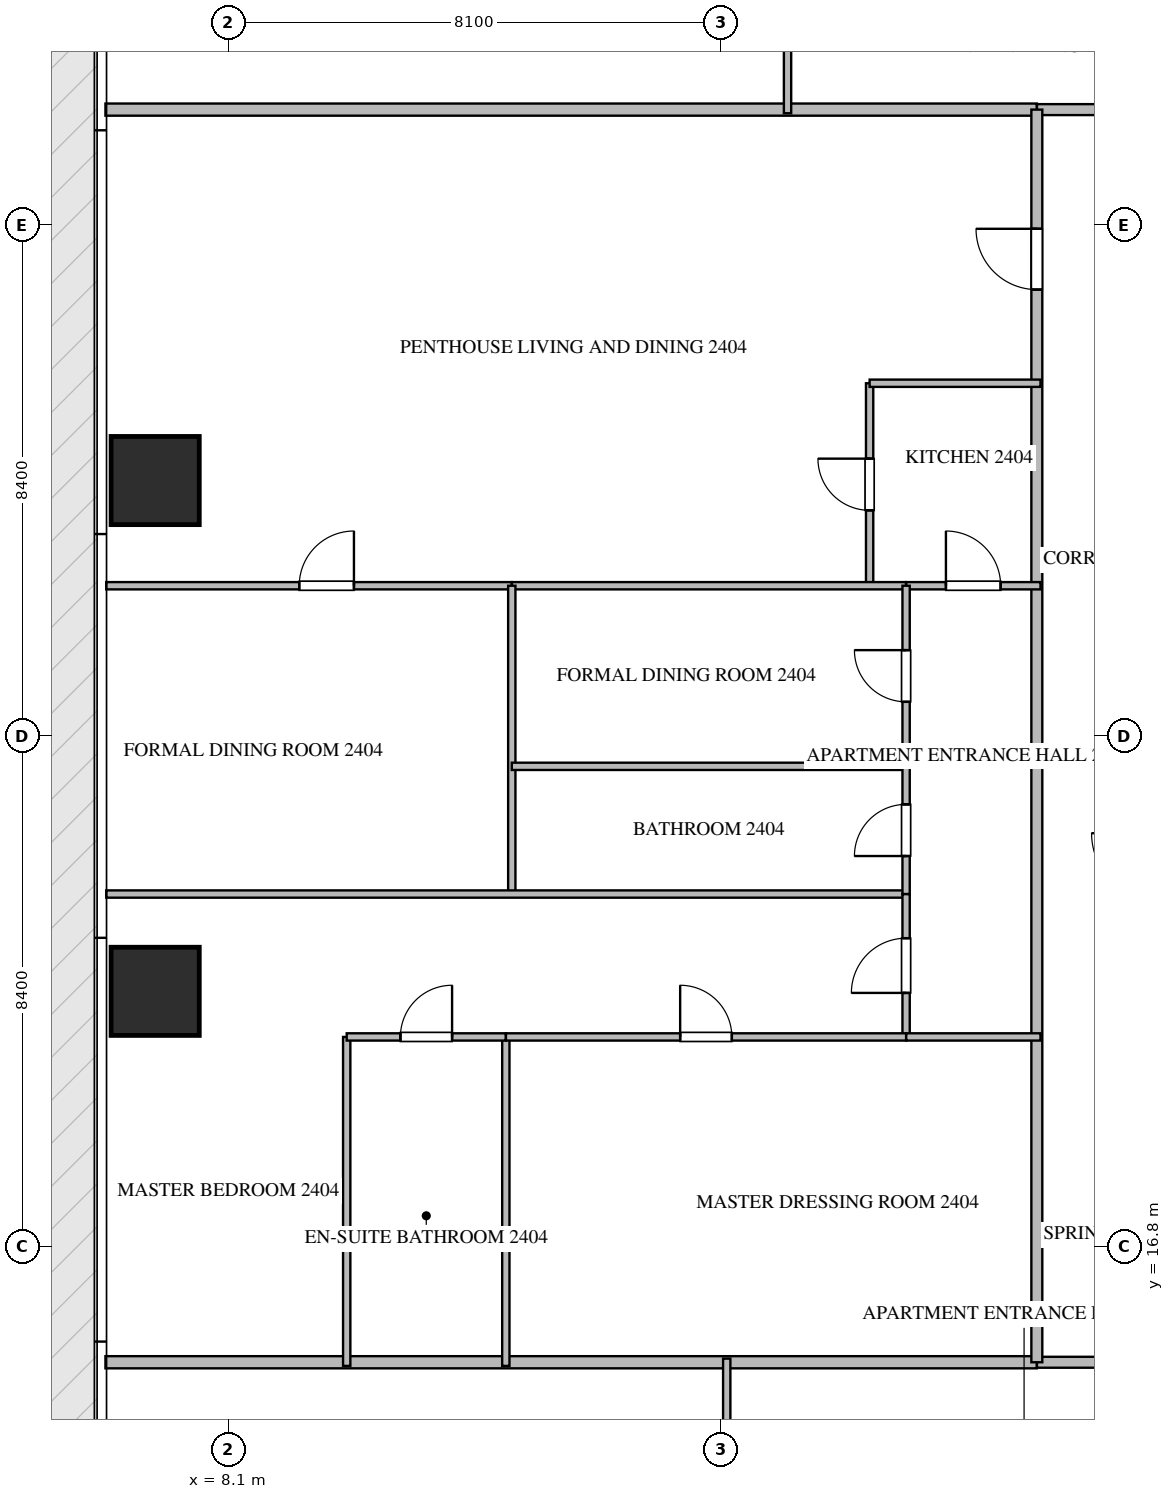
"""IFC4 building model, lengths in metres.
Left out: names, types, materials, properties, quantities, classifications, styles, units other than length and angle.
Written with IfcOpenShell. Run it as: python <this file> out.ifc"""

import sys

from ifc_helpers import new_model, si_unit, direction, frame, frame_2d, origin, origin_2d, place, context, subcontext, project, spatial, rectangle, extrude, source, transform, mapped, element, fill, save


model = new_model("IFC4")
c1 = context("Model", 3, precision=1e-05, world=origin(), true_north=direction((0.0, 1.0)))
c2 = subcontext(c1, "Body", "Model", "MODEL_VIEW")
j1 = project(units=[si_unit("LENGTHUNIT", "METRE"), si_unit("PLANEANGLEUNIT", "RADIAN")], contexts=[c1])
p1 = place(None, origin())
s1 = spatial("IfcSite", under=j1, at=p1, CompositionType="ELEMENT")
p2 = place(p1, origin())
s2 = spatial("IfcBuilding", under=s1, at=p2, CompositionType="ELEMENT")
p3 = place(p2, frame((0.0, 0.0, 97.95)))
s3 = spatial("IfcBuildingStorey", under=s2, at=p3, CompositionType="ELEMENT", Elevation=97.95)
m1 = source(origin(), c2, "Body", "SweptSolid", [
    extrude(rectangle(XDim=1.45, YDim=1.45, at=origin_2d()), origin(), (0.0, 0.0, 1.0), 3.75),
])
for number, where, z_axis, x_axis in (
    (1, (6.9, 21.0, -0.26), (0.0, 0.0, 1.0), (1.0, 0.0, 0.0)),
    (2, (6.9, 29.4, -0.26), (0.0, 0.0, 1.0), (1.0, 0.0, 0.0)),
):
    element("IfcColumn", number, at=place(p3, frame(where, z_axis=z_axis, x_axis=x_axis)), inside=s3, PredefinedType="COLUMN", context=c2, shape_type="MappedRepresentation", body=[
        mapped(m1, transform((0.0, 0.0, 0.0), scale=1.0)),
    ])
for number, where, z_axis, x_axis in (
    (3, (6.082, 14.9, 0.0), (0.0, 0.0, 1.0), (1.0, 0.0, 0.0)),
    (4, (6.082, 35.5, 0.0), (0.0, 0.0, 1.0), (1.0, 0.0, 0.0)),
):
    element("IfcWall", number, at=place(p3, frame(where, z_axis=z_axis, x_axis=x_axis)), inside=s3, PredefinedType="PARTITIONING", context=c2, shape_type="SweptSolid", body=[
        extrude(rectangle(XDim=15.318, YDim=0.2, at=frame_2d((7.659, 0.0))), origin(), (0.0, 0.0, 1.0), 3.49),
    ])
p4 = place(p3, frame((21.402, 14.9, 0.0), z_axis=(0.0, 0.0, 1.0), x_axis=(1.0, 0.0, 0.0)))
e5 = element("IfcWall", 5, at=p4, inside=s3, PredefinedType="PARTITIONING", context=c2, shape_type="SweptSolid", body=[
    extrude(rectangle(XDim=21.996, YDim=0.18, at=frame_2d((10.998, 0.0))), origin(), (0.0, 0.0, 1.0), 3.49),
])
p5 = place(p4, frame((7.454, 0.0, 0.0)))
e6 = element("IfcOpeningElement", 6, at=p5, cuts=e5, PredefinedType="OPENING", context=c2, shape_type="SweptSolid", body=[
    extrude(rectangle(XDim=1.0, YDim=2.15, at=frame_2d((0.5, 1.075))), frame((0.0, 0.1, 0.0), z_axis=(0.0, -1.0, 0.0), x_axis=(1.0, 0.0, 0.0)), (0.0, 0.0, 1.0), 0.2),
])
p6 = place(p4, frame((13.542, 0.0, 0.0)))
e7 = element("IfcOpeningElement", 7, at=p6, cuts=e5, PredefinedType="OPENING", context=c2, shape_type="SweptSolid", body=[
    extrude(rectangle(XDim=1.0, YDim=2.15, at=frame_2d((0.5, 1.075))), frame((0.0, 0.1, 0.0), z_axis=(0.0, -1.0, 0.0), x_axis=(1.0, 0.0, 0.0)), (0.0, 0.0, 1.0), 0.2),
])
p7 = place(p3, frame((21.402, 35.5, 0.0), z_axis=(0.0, 0.0, 1.0), x_axis=(1.0, 0.0, 0.0)))
e8 = element("IfcWall", 8, at=p7, inside=s3, PredefinedType="PARTITIONING", context=c2, shape_type="SweptSolid", body=[
    extrude(rectangle(XDim=21.996, YDim=0.18, at=frame_2d((10.998, 0.0))), origin(), (0.0, 0.0, 1.0), 3.49),
])
p8 = place(p7, frame((7.202, 0.0, 0.0)))
e9 = element("IfcOpeningElement", 9, at=p8, cuts=e8, PredefinedType="OPENING", context=c2, shape_type="SweptSolid", body=[
    extrude(rectangle(XDim=1.0, YDim=2.15, at=frame_2d((0.5, 1.075))), frame((0.0, 0.1, 0.0), z_axis=(0.0, -1.0, 0.0), x_axis=(1.0, 0.0, 0.0)), (0.0, 0.0, 1.0), 0.2),
])
p9 = place(p3, frame((21.4, 14.9, 0.0), z_axis=(0.0, 0.0, 1.0), x_axis=(0.0, 1.0, 0.0)))
e10 = element("IfcWall", 10, at=p9, inside=s3, PredefinedType="PARTITIONING", context=c2, shape_type="SweptSolid", body=[
    extrude(rectangle(XDim=20.6, YDim=0.18, at=frame_2d((10.3, 0.0))), origin(), (0.0, 0.0, 1.0), 3.49),
])
p10 = place(p9, frame((17.64, 0.0, 0.0)))
e11 = element("IfcOpeningElement", 11, at=p10, cuts=e10, PredefinedType="OPENING", context=c2, shape_type="SweptSolid", body=[
    extrude(rectangle(XDim=1.0, YDim=2.15, at=frame_2d((0.5, 1.075))), frame((0.0, 0.1, 0.0), z_axis=(0.0, -1.0, 0.0), x_axis=(1.0, 0.0, 0.0)), (0.0, 0.0, 1.0), 0.2),
])
for number, where, z_axis, x_axis in (
    (12, (16.3, 12.752, 0.0), (0.0, 0.0, 1.0), (0.0, 1.0, 0.0)),
    (13, (17.3, 37.648, 0.0), (0.0, 0.0, 1.0), (0.0, -1.0, 0.0)),
):
    element("IfcWall", number, at=place(p3, frame(where, z_axis=z_axis, x_axis=x_axis)), inside=s3, PredefinedType="PARTITIONING", context=c2, shape_type="SweptSolid", body=[
        extrude(rectangle(XDim=2.208, YDim=0.12, at=frame_2d((1.104, 0.0))), origin(), (0.0, 0.0, 1.0), 3.49),
    ])
p11 = place(p3, frame((18.65, 27.67, 0.0), z_axis=(0.0, 0.0, 1.0), x_axis=(0.0, 1.0, 0.0)))
e14 = element("IfcWall", 14, at=p11, inside=s3, PredefinedType="PARTITIONING", context=c2, shape_type="SweptSolid", body=[
    extrude(rectangle(XDim=3.33, YDim=0.12, at=frame_2d((1.665, 0.0))), origin(), (0.0, 0.0, 1.0), 3.49),
])
p12 = place(p11, frame((1.24, 0.0, 0.0)))
e15 = element("IfcOpeningElement", 15, at=p12, cuts=e14, PredefinedType="OPENING", context=c2, shape_type="SweptSolid", body=[
    extrude(rectangle(XDim=0.85, YDim=2.1, at=frame_2d((0.425, 1.05))), frame((0.0, 0.07, 0.0), z_axis=(0.0, -1.0, 0.0), x_axis=(1.0, 0.0, 0.0)), (0.0, 0.0, 1.0), 0.14),
])
p13 = place(p3, frame((18.65, 31.0, 0.0), z_axis=(0.0, 0.0, 1.0), x_axis=(1.0, 0.0, 0.0)))
e16 = element("IfcWall", 16, at=p13, inside=s3, PredefinedType="PARTITIONING", context=c2, shape_type="SweptSolid", body=[
    extrude(rectangle(XDim=2.81, YDim=0.12, at=frame_2d((1.405, 0.0))), origin(), (0.0, 0.0, 1.0), 3.49),
])
p14 = place(p3, frame((19.25, 27.67, 0.0), z_axis=(0.0, 0.0, 1.0), x_axis=(1.0, 0.0, 0.0)))
e17 = element("IfcWall", 17, at=p14, inside=s3, PredefinedType="PARTITIONING", context=c2, shape_type="SweptSolid", body=[
    extrude(rectangle(XDim=2.21, YDim=0.12, at=frame_2d((1.105, 0.0))), origin(), (0.0, 0.0, 1.0), 3.49),
])
p15 = place(p14, frame((0.655, 0.0, 0.0)))
e18 = element("IfcOpeningElement", 18, at=p15, cuts=e17, PredefinedType="OPENING", context=c2, shape_type="SweptSolid", body=[
    extrude(rectangle(XDim=0.9, YDim=2.1, at=frame_2d((0.45, 1.05))), frame((0.0, 0.07, 0.0), z_axis=(0.0, -1.0, 0.0), x_axis=(1.0, 0.0, 0.0)), (0.0, 0.0, 1.0), 0.14),
])
p16 = place(p3, frame((6.095, 27.67, 0.0), z_axis=(0.0, 0.0, 1.0), x_axis=(1.0, 0.0, 0.0)))
e19 = element("IfcWall", 19, at=p16, inside=s3, PredefinedType="PARTITIONING", context=c2, shape_type="SweptSolid", body=[
    extrude(rectangle(XDim=6.67, YDim=0.12, at=frame_2d((3.335, 0.0))), origin(), (0.0, 0.0, 1.0), 3.49),
])
p17 = place(p16, frame((3.174, 0.0, 0.0)))
e20 = element("IfcOpeningElement", 20, at=p17, cuts=e19, PredefinedType="OPENING", context=c2, shape_type="SweptSolid", body=[
    extrude(rectangle(XDim=0.9, YDim=2.1, at=frame_2d((0.45, 1.05))), frame((0.0, 0.07, 0.0), z_axis=(0.0, -1.0, 0.0), x_axis=(1.0, 0.0, 0.0)), (0.0, 0.0, 1.0), 0.14),
])
p18 = place(p3, frame((12.767, 27.67, 0.0), z_axis=(0.0, 0.0, 1.0), x_axis=(1.0, 0.0, 0.0)))
e21 = element("IfcWall", 21, at=p18, inside=s3, PredefinedType="PARTITIONING", context=c2, shape_type="SweptSolid", body=[
    extrude(rectangle(XDim=6.481, YDim=0.12, at=frame_2d((3.24, 0.0))), origin(), (0.0, 0.0, 1.0), 3.49),
])
p19 = place(p3, frame((12.765, 22.6, 0.0), z_axis=(0.0, 0.0, 1.0), x_axis=(0.0, 1.0, 0.0)))
e22 = element("IfcWall", 22, at=p19, inside=s3, PredefinedType="PARTITIONING", context=c2, shape_type="SweptSolid", body=[
    extrude(rectangle(XDim=5.07, YDim=0.12, at=frame_2d((2.535, 0.0))), origin(), (0.0, 0.0, 1.0), 3.49),
])
p20 = place(p3, frame((6.095, 22.6, 0.0), z_axis=(0.0, 0.0, 1.0), x_axis=(1.0, 0.0, 0.0)))
e23 = element("IfcWall", 23, at=p20, inside=s3, PredefinedType="PARTITIONING", context=c2, shape_type="SweptSolid", body=[
    extrude(rectangle(XDim=13.155, YDim=0.12, at=frame_2d((6.578, 0.0))), origin(), (0.0, 0.0, 1.0), 3.49),
])
p21 = place(p3, frame((12.765, 24.7, 0.0), z_axis=(0.0, 0.0, 1.0), x_axis=(1.0, 0.0, 0.0)))
e24 = element("IfcWall", 24, at=p21, inside=s3, PredefinedType="PARTITIONING", context=c2, shape_type="SweptSolid", body=[
    extrude(rectangle(XDim=6.485, YDim=0.12, at=frame_2d((3.243, 0.0))), origin(), (0.0, 0.0, 1.0), 3.49),
])
p22 = place(p3, frame((19.25, 22.6, 0.0), z_axis=(0.0, 0.0, 1.0), x_axis=(0.0, 1.0, 0.0)))
e25 = element("IfcWall", 25, at=p22, inside=s3, PredefinedType="PARTITIONING", context=c2, shape_type="SweptSolid", body=[
    extrude(rectangle(XDim=2.1, YDim=0.12, at=frame_2d((1.05, 0.0))), origin(), (0.0, 0.0, 1.0), 3.49),
])
p23 = place(p22, frame((0.625, 0.0, 0.0)))
e26 = element("IfcOpeningElement", 26, at=p23, cuts=e25, PredefinedType="OPENING", context=c2, shape_type="SweptSolid", body=[
    extrude(rectangle(XDim=0.85, YDim=2.1, at=frame_2d((0.425, 1.05))), frame((0.0, 0.07, 0.0), z_axis=(0.0, -1.0, 0.0), x_axis=(1.0, 0.0, 0.0)), (0.0, 0.0, 1.0), 0.14),
])
p24 = place(p3, frame((19.25, 24.702, 0.0), z_axis=(0.0, 0.0, 1.0), x_axis=(0.0, 1.0, 0.0)))
e27 = element("IfcWall", 27, at=p24, inside=s3, PredefinedType="PARTITIONING", context=c2, shape_type="SweptSolid", body=[
    extrude(rectangle(XDim=2.968, YDim=0.12, at=frame_2d((1.484, 0.0))), origin(), (0.0, 0.0, 1.0), 3.49),
])
p25 = place(p24, frame((1.059, 0.0, 0.0)))
e28 = element("IfcOpeningElement", 28, at=p25, cuts=e27, PredefinedType="OPENING", context=c2, shape_type="SweptSolid", body=[
    extrude(rectangle(XDim=0.85, YDim=2.1, at=frame_2d((0.425, 1.05))), frame((0.0, 0.07, 0.0), z_axis=(0.0, -1.0, 0.0), x_axis=(1.0, 0.0, 0.0)), (0.0, 0.0, 1.0), 0.14),
])
p26 = place(p3, frame((19.25, 20.25, 0.0), z_axis=(0.0, 0.0, 1.0), x_axis=(0.0, 1.0, 0.0)))
e29 = element("IfcWall", 29, at=p26, inside=s3, PredefinedType="PARTITIONING", context=c2, shape_type="SweptSolid", body=[
    extrude(rectangle(XDim=2.348, YDim=0.12, at=frame_2d((1.174, 0.0))), origin(), (0.0, 0.0, 1.0), 3.49),
])
p27 = place(p26, frame((0.724, 0.0, 0.0)))
e30 = element("IfcOpeningElement", 30, at=p27, cuts=e29, PredefinedType="OPENING", context=c2, shape_type="SweptSolid", body=[
    extrude(rectangle(XDim=0.9, YDim=2.1, at=frame_2d((0.45, 1.05))), frame((0.0, 0.07, 0.0), z_axis=(0.0, -1.0, 0.0), x_axis=(1.0, 0.0, 0.0)), (0.0, 0.0, 1.0), 0.14),
])
for number, where, z_axis, x_axis in (
    (31, (10.05, 14.84, 0.0), (0.0, 0.0, 1.0), (0.0, 1.0, 0.0)),
    (32, (12.667, 14.84, 0.0), (0.0, 0.0, 1.0), (0.0, 1.0, 0.0)),
):
    element("IfcWall", number, at=place(p3, frame(where, z_axis=z_axis, x_axis=x_axis)), inside=s3, PredefinedType="PARTITIONING", context=c2, shape_type="SweptSolid", body=[
        extrude(rectangle(XDim=5.41, YDim=0.12, at=frame_2d((2.705, 0.0))), origin(), (0.0, 0.0, 1.0), 3.49),
    ])
p28 = place(p3, frame((10.05, 20.25, 0.0), z_axis=(0.0, 0.0, 1.0), x_axis=(1.0, 0.0, 0.0)))
e33 = element("IfcWall", 33, at=p28, inside=s3, PredefinedType="PARTITIONING", context=c2, shape_type="SweptSolid", body=[
    extrude(rectangle(XDim=2.617, YDim=0.12, at=frame_2d((1.309, 0.0))), origin(), (0.0, 0.0, 1.0), 3.49),
])
p29 = place(p28, frame((0.883, 0.0, 0.0)))
e34 = element("IfcOpeningElement", 34, at=p29, cuts=e33, PredefinedType="OPENING", context=c2, shape_type="SweptSolid", body=[
    extrude(rectangle(XDim=0.85, YDim=2.1, at=frame_2d((0.425, 1.05))), frame((0.0, 0.07, 0.0), z_axis=(0.0, -1.0, 0.0), x_axis=(1.0, 0.0, 0.0)), (0.0, 0.0, 1.0), 0.14),
])
p30 = place(p3, frame((12.669, 20.25, 0.0), z_axis=(0.0, 0.0, 1.0), x_axis=(1.0, 0.0, 0.0)))
e35 = element("IfcWall", 35, at=p30, inside=s3, PredefinedType="PARTITIONING", context=c2, shape_type="SweptSolid", body=[
    extrude(rectangle(XDim=6.581, YDim=0.12, at=frame_2d((3.291, 0.0))), origin(), (0.0, 0.0, 1.0), 3.49),
])
p31 = place(p30, frame((2.865, 0.0, 0.0)))
e36 = element("IfcOpeningElement", 36, at=p31, cuts=e35, PredefinedType="OPENING", context=c2, shape_type="SweptSolid", body=[
    extrude(rectangle(XDim=0.85, YDim=2.1, at=frame_2d((0.425, 1.05))), frame((0.0, 0.07, 0.0), z_axis=(0.0, -1.0, 0.0), x_axis=(1.0, 0.0, 0.0)), (0.0, 0.0, 1.0), 0.14),
])
p32 = place(p3, frame((19.252, 20.25, 0.0), z_axis=(0.0, 0.0, 1.0), x_axis=(1.0, 0.0, 0.0)))
e37 = element("IfcWall", 37, at=p32, inside=s3, PredefinedType="PARTITIONING", context=c2, shape_type="SweptSolid", body=[
    extrude(rectangle(XDim=2.208, YDim=0.12, at=frame_2d((1.104, 0.0))), origin(), (0.0, 0.0, 1.0), 3.49),
])
m2 = source(origin(), c2, "Body", "SweptSolid", [
    extrude(rectangle(XDim=1.0, YDim=2.15, at=frame_2d((0.5, 1.075))), frame((0.0, 0.025, 0.0), z_axis=(0.0, -1.0, 0.0), x_axis=(1.0, 0.0, 0.0)), (0.0, 0.0, 1.0), 0.05),
])
p33 = place(p10, origin())
e38 = element("IfcDoor", 38, at=p33, inside=s3, OperationType="SINGLE_SWING_RIGHT", PredefinedType="DOOR", context=c2, shape_type="MappedRepresentation", body=[
    mapped(m2, transform((0.0, 0.0, 0.0), scale=1.0)),
])
fill(e11, e38)
m3 = source(origin(), c2, "Body", "SweptSolid", [
    extrude(rectangle(XDim=0.85, YDim=2.1, at=frame_2d((0.425, 1.05))), frame((0.0, 0.025, 0.0), z_axis=(0.0, -1.0, 0.0), x_axis=(1.0, 0.0, 0.0)), (0.0, 0.0, 1.0), 0.05),
])
p34 = place(p12, origin())
e39 = element("IfcDoor", 39, at=p34, inside=s3, OperationType="SINGLE_SWING_RIGHT", PredefinedType="DOOR", context=c2, shape_type="MappedRepresentation", body=[
    mapped(m3, transform((0.0, 0.0, 0.0), scale=1.0)),
])
fill(e15, e39)
m4 = source(origin(), c2, "Body", "SweptSolid", [
    extrude(rectangle(XDim=0.9, YDim=2.1, at=frame_2d((0.45, 1.05))), frame((0.0, 0.025, 0.0), z_axis=(0.0, -1.0, 0.0), x_axis=(1.0, 0.0, 0.0)), (0.0, 0.0, 1.0), 0.05),
])
p35 = place(p15, origin())
e40 = element("IfcDoor", 40, at=p35, inside=s3, OperationType="SINGLE_SWING_LEFT", PredefinedType="DOOR", context=c2, shape_type="MappedRepresentation", body=[
    mapped(m4, transform((0.0, 0.0, 0.0), scale=1.0)),
])
fill(e18, e40)
p36 = place(p17, origin())
e41 = element("IfcDoor", 41, at=p36, inside=s3, OperationType="SINGLE_SWING_RIGHT", PredefinedType="DOOR", context=c2, shape_type="MappedRepresentation", body=[
    mapped(m4, transform((0.0, 0.0, 0.0), scale=1.0)),
])
fill(e20, e41)
p37 = place(p23, origin())
e42 = element("IfcDoor", 42, at=p37, inside=s3, OperationType="SINGLE_SWING_LEFT", PredefinedType="DOOR", context=c2, shape_type="MappedRepresentation", body=[
    mapped(m3, transform((0.0, 0.0, 0.0), scale=1.0)),
])
fill(e26, e42)
p38 = place(p25, origin())
e43 = element("IfcDoor", 43, at=p38, inside=s3, OperationType="SINGLE_SWING_RIGHT", PredefinedType="DOOR", context=c2, shape_type="MappedRepresentation", body=[
    mapped(m3, transform((0.0, 0.0, 0.0), scale=1.0)),
])
fill(e28, e43)
p39 = place(p27, origin())
e44 = element("IfcDoor", 44, at=p39, inside=s3, OperationType="SINGLE_SWING_LEFT", PredefinedType="DOOR", context=c2, shape_type="MappedRepresentation", body=[
    mapped(m4, transform((0.0, 0.0, 0.0), scale=1.0)),
])
fill(e30, e44)
p40 = place(p29, origin())
e45 = element("IfcDoor", 45, at=p40, inside=s3, OperationType="SINGLE_SWING_RIGHT", PredefinedType="DOOR", context=c2, shape_type="MappedRepresentation", body=[
    mapped(m3, transform((0.0, 0.0, 0.0), scale=1.0)),
])
fill(e34, e45)
p41 = place(p31, origin())
e46 = element("IfcDoor", 46, at=p41, inside=s3, OperationType="SINGLE_SWING_LEFT", PredefinedType="DOOR", context=c2, shape_type="MappedRepresentation", body=[
    mapped(m3, transform((0.0, 0.0, 0.0), scale=1.0)),
])
fill(e36, e46)
save(model, sys.argv[1])
